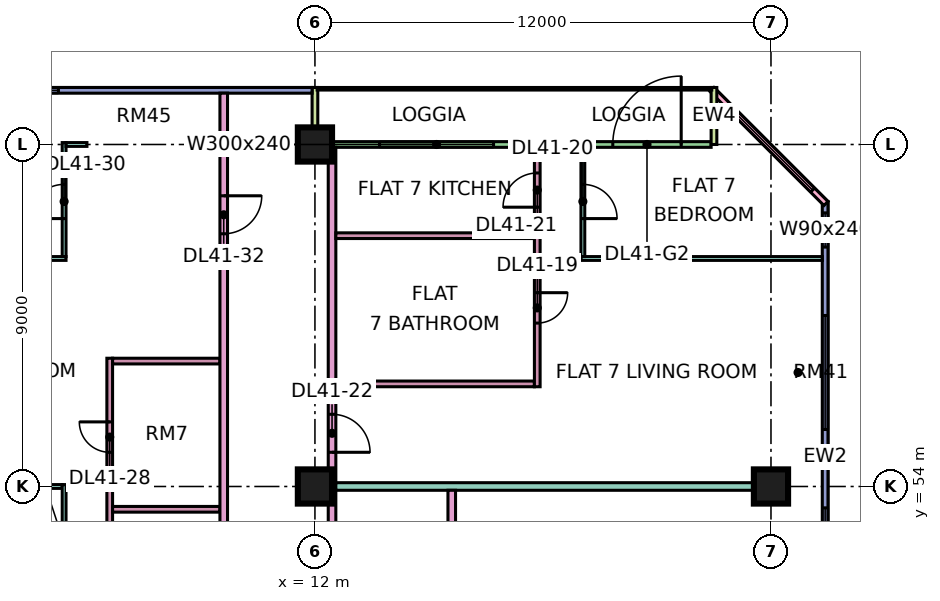
"""IFC4 building model, lengths in metres.
Left out: names, types, materials, properties, quantities, classifications, styles, units other than length and angle.
Written with IfcOpenShell. Run it as: python <this file> out.ifc"""

import sys

from ifc_helpers import new_model, si_unit, direction, frame, frame_2d, origin, origin_2d, place, context, subcontext, project, spatial, rectangle, extrude, element, fill, save


model = new_model("IFC4")
c1 = context("Model", 3, precision=1e-05, world=origin(), true_north=direction((0.0, 1.0)))
c2 = subcontext(c1, "Body", "Model", "MODEL_VIEW")
j1 = project(units=[si_unit("LENGTHUNIT", "METRE"), si_unit("PLANEANGLEUNIT", "RADIAN")], contexts=[c1])
p1 = place(None, origin())
s1 = spatial("IfcSite", under=j1, at=p1, CompositionType="ELEMENT")
p2 = place(p1, origin())
s2 = spatial("IfcBuilding", under=s1, at=p2, CompositionType="ELEMENT")
p3 = place(p2, frame((0.0, 0.0, 179.9)))
s3 = spatial("IfcBuildingStorey", under=s2, at=p3, CompositionType="ELEMENT", Elevation=179.9)
for number, where, z_axis, x_axis in (
    (1, (12.0, 54.0, 0.0), (0.0, 0.0, 1.0), (1.0, 0.0, 0.0)),
    (2, (12.0, 63.0, 0.0), (0.0, 0.0, 1.0), (1.0, 0.0, 0.0)),
    (3, (24.0, 54.0, 0.0), (0.0, 0.0, 1.0), (1.0, 0.0, 0.0)),
):
    element("IfcColumn", number, at=place(p3, frame(where, z_axis=z_axis, x_axis=x_axis)), inside=s3, PredefinedType="COLUMN", context=c2, shape_type="SweptSolid", body=[
        extrude(rectangle(XDim=0.9, YDim=0.9, at=origin_2d()), origin(), (0.0, 0.0, 1.0), 3.75),
    ])
p4 = place(p3, frame((25.425, 48.075, 0.0), z_axis=(0.0, 0.0, 1.0), x_axis=(0.0, 1.0, 0.0)))
e4 = element("IfcWall", 4, at=p4, inside=s3, PredefinedType="SOLIDWALL", context=c2, shape_type="SweptSolid", body=[
    extrude(rectangle(XDim=13.425, YDim=0.15, at=frame_2d((6.712, 0.0))), origin(), (0.0, 0.0, 1.0), 3.35),
])
p5 = place(p4, frame((0.562, 0.0, 0.45)))
e5 = element("IfcOpeningElement", 5, at=p5, cuts=e4, PredefinedType="OPENING", context=c2, shape_type="SweptSolid", body=[
    extrude(rectangle(XDim=4.8, YDim=2.4, at=frame_2d((2.4, 1.2))), frame((0.0, 0.085, 0.0), z_axis=(0.0, -1.0, 0.0), x_axis=(1.0, 0.0, 0.0)), (0.0, 0.0, 1.0), 0.17),
])
p6 = place(p4, frame((7.425, 0.0, 0.45)))
e6 = element("IfcOpeningElement", 6, at=p6, cuts=e4, PredefinedType="OPENING", context=c2, shape_type="SweptSolid", body=[
    extrude(rectangle(XDim=3.0, YDim=2.4, at=frame_2d((1.5, 1.2))), frame((0.0, 0.085, 0.0), z_axis=(0.0, -1.0, 0.0), x_axis=(1.0, 0.0, 0.0)), (0.0, 0.0, 1.0), 0.17),
])
p7 = place(p4, frame((12.225, 0.0, 0.45)))
e7 = element("IfcOpeningElement", 7, at=p7, cuts=e4, PredefinedType="OPENING", context=c2, shape_type="SweptSolid", body=[
    extrude(rectangle(XDim=0.9, YDim=2.4, at=frame_2d((0.45, 1.2))), frame((0.0, 0.085, 0.0), z_axis=(0.0, -1.0, 0.0), x_axis=(1.0, 0.0, 0.0)), (0.0, 0.0, 1.0), 0.17),
])
p8 = place(p3, frame((25.447, 61.447, 0.0), z_axis=(0.0, 0.0, 1.0), x_axis=(-0.707106781187, 0.707106781187, 0.0)))
e8 = element("IfcWall", 8, at=p8, inside=s3, PredefinedType="SOLIDWALL", context=c2, shape_type="SweptSolid", body=[
    extrude(rectangle(XDim=4.243, YDim=0.15, at=frame_2d((2.121, 0.0))), origin(), (0.0, 0.0, 1.0), 3.35),
])
p9 = place(p8, frame((0.498, 0.0, 0.45)))
e9 = element("IfcOpeningElement", 9, at=p9, cuts=e8, PredefinedType="OPENING", context=c2, shape_type="SweptSolid", body=[
    extrude(rectangle(XDim=3.0, YDim=2.4, at=frame_2d((1.5, 1.2))), frame((0.0, 0.085, 0.0), z_axis=(0.0, -1.0, 0.0), x_axis=(1.0, 0.0, 0.0)), (0.0, 0.0, 1.0), 0.17),
])
p10 = place(p3, frame((22.425, 63.0, 0.0), z_axis=(0.0, 0.0, 1.0), x_axis=(-1.0, 0.0, 0.0)))
e10 = element("IfcWall", 10, at=p10, inside=s3, PredefinedType="SOLIDWALL", context=c2, shape_type="SweptSolid", body=[
    extrude(rectangle(XDim=10.35, YDim=0.15, at=frame_2d((5.175, 0.0))), origin(), (0.0, 0.0, 1.0), 3.35),
])
p11 = place(p10, frame((0.788, 0.0, 0.0)))
e11 = element("IfcOpeningElement", 11, at=p11, cuts=e10, PredefinedType="OPENING", context=c2, shape_type="SweptSolid", body=[
    extrude(rectangle(XDim=1.8, YDim=2.4, at=frame_2d((0.9, 1.2))), frame((0.0, 0.085, 0.0), z_axis=(0.0, -1.0, 0.0), x_axis=(1.0, 0.0, 0.0)), (0.0, 0.0, 1.0), 0.17),
])
p12 = place(p10, frame((5.725, 0.0, 0.45)))
e12 = element("IfcOpeningElement", 12, at=p12, cuts=e10, PredefinedType="OPENING", context=c2, shape_type="SweptSolid", body=[
    extrude(rectangle(XDim=3.0, YDim=2.4, at=frame_2d((1.5, 1.2))), frame((0.0, 0.085, 0.0), z_axis=(0.0, -1.0, 0.0), x_axis=(1.0, 0.0, 0.0)), (0.0, 0.0, 1.0), 0.17),
])
for number, where, z_axis, x_axis in (
    (13, (22.5, 64.5, 0.0), (0.0, 0.0, 1.0), (0.0, -1.0, 0.0)),
    (14, (12.0, 64.5, 0.0), (0.0, 0.0, 1.0), (0.0, -1.0, 0.0)),
):
    element("IfcWall", number, at=place(p3, frame(where, z_axis=z_axis, x_axis=x_axis)), inside=s3, PredefinedType="SOLIDWALL", context=c2, shape_type="SweptSolid", body=[
        extrude(rectangle(XDim=1.5, YDim=0.15, at=frame_2d((0.75, 0.0))), origin(), (0.0, 0.0, 1.0), 3.35),
    ])
p13 = place(p3, frame((11.925, 64.425, 0.0), z_axis=(0.0, 0.0, 1.0), x_axis=(-1.0, 0.0, 0.0)))
e15 = element("IfcWall", 15, at=p13, inside=s3, PredefinedType="SOLIDWALL", context=c2, shape_type="SweptSolid", body=[
    extrude(rectangle(XDim=10.425, YDim=0.15, at=frame_2d((5.212, 0.0))), origin(), (0.0, 0.0, 1.0), 3.35),
])
p14 = place(p13, frame((6.675, 0.0, 0.45)))
e16 = element("IfcOpeningElement", 16, at=p14, cuts=e15, PredefinedType="OPENING", context=c2, shape_type="SweptSolid", body=[
    extrude(rectangle(XDim=3.0, YDim=2.4, at=frame_2d((1.5, 1.2))), frame((0.0, 0.085, 0.0), z_axis=(0.0, -1.0, 0.0), x_axis=(1.0, 0.0, 0.0)), (0.0, 0.0, 1.0), 0.17),
])
p15 = place(p3, frame((0.0, 54.0, 0.0), z_axis=(0.0, 0.0, 1.0), x_axis=(1.0, 0.0, 0.0)))
e17 = element("IfcWall", 17, at=p15, inside=s3, PredefinedType="PARTITIONING", context=c2, shape_type="SweptSolid", body=[
    extrude(rectangle(XDim=5.35, YDim=0.1, at=frame_2d((2.675, 0.0))), origin(), (0.0, 0.0, 1.0), 3.35),
])
p16 = place(p3, frame((-1.35, 60.0, 0.0), z_axis=(0.0, 0.0, 1.0), x_axis=(1.0, 0.0, 0.0)))
e18 = element("IfcWall", 18, at=p16, inside=s3, PredefinedType="PARTITIONING", context=c2, shape_type="SweptSolid", body=[
    extrude(rectangle(XDim=6.8, YDim=0.1, at=frame_2d((3.4, 0.0))), origin(), (0.0, 0.0, 1.0), 3.35),
])
p17 = place(p3, frame((5.4, 48.1, 0.0), z_axis=(0.0, 0.0, 1.0), x_axis=(0.0, 1.0, 0.0)))
e19 = element("IfcWall", 19, at=p17, inside=s3, PredefinedType="PARTITIONING", context=c2, shape_type="SweptSolid", body=[
    extrude(rectangle(XDim=5.95, YDim=0.1, at=frame_2d((2.975, 0.0))), origin(), (0.0, 0.0, 1.0), 3.35),
])
p18 = place(p17, frame((0.95, 0.0, 0.0)))
e20 = element("IfcOpeningElement", 20, at=p18, cuts=e19, PredefinedType="OPENING", context=c2, shape_type="SweptSolid", body=[
    extrude(rectangle(XDim=0.9, YDim=2.1, at=frame_2d((0.45, 1.05))), frame((0.0, 0.06, 0.0), z_axis=(0.0, -1.0, 0.0), x_axis=(1.0, 0.0, 0.0)), (0.0, 0.0, 1.0), 0.12),
])
p19 = place(p17, frame((3.95, 0.0, 0.0)))
e21 = element("IfcOpeningElement", 21, at=p19, cuts=e19, PredefinedType="OPENING", context=c2, shape_type="SweptSolid", body=[
    extrude(rectangle(XDim=0.9, YDim=2.1, at=frame_2d((0.45, 1.05))), frame((0.0, 0.06, 0.0), z_axis=(0.0, -1.0, 0.0), x_axis=(1.0, 0.0, 0.0)), (0.0, 0.0, 1.0), 0.12),
])
p20 = place(p3, frame((5.4, 60.05, 0.0), z_axis=(0.0, 0.0, 1.0), x_axis=(0.0, 1.0, 0.0)))
e22 = element("IfcWall", 22, at=p20, inside=s3, PredefinedType="PARTITIONING", context=c2, shape_type="SweptSolid", body=[
    extrude(rectangle(XDim=3.0, YDim=0.1, at=frame_2d((1.5, 0.0))), origin(), (0.0, 0.0, 1.0), 3.35),
])
p21 = place(p20, frame((1.0, 0.0, 0.0)))
e23 = element("IfcOpeningElement", 23, at=p21, cuts=e22, PredefinedType="OPENING", context=c2, shape_type="SweptSolid", body=[
    extrude(rectangle(XDim=0.9, YDim=2.1, at=frame_2d((0.45, 1.05))), frame((0.0, 0.06, 0.0), z_axis=(0.0, -1.0, 0.0), x_axis=(1.0, 0.0, 0.0)), (0.0, 0.0, 1.0), 0.12),
])
p22 = place(p3, frame((5.45, 63.0, 0.0), z_axis=(0.0, 0.0, 1.0), x_axis=(1.0, 0.0, 0.0)))
e24 = element("IfcWall", 24, at=p22, inside=s3, PredefinedType="PARTITIONING", context=c2, shape_type="SweptSolid", body=[
    extrude(rectangle(XDim=0.55, YDim=0.1, at=frame_2d((0.275, 0.0))), origin(), (0.0, 0.0, 1.0), 3.35),
])
p23 = place(p3, frame((6.6, 48.1, 0.0), z_axis=(0.0, 0.0, 1.0), x_axis=(0.0, 1.0, 0.0)))
e25 = element("IfcWall", 25, at=p23, inside=s3, PredefinedType="PARTITIONING", context=c2, shape_type="SweptSolid", body=[
    extrude(rectangle(XDim=9.275, YDim=0.15, at=frame_2d((4.637, 0.0))), origin(), (0.0, 0.0, 1.0), 3.35),
])
p24 = place(p23, frame((6.8, 0.0, 0.0)))
e26 = element("IfcOpeningElement", 26, at=p24, cuts=e25, PredefinedType="OPENING", context=c2, shape_type="SweptSolid", body=[
    extrude(rectangle(XDim=0.8, YDim=2.1, at=frame_2d((0.4, 1.05))), frame((0.0, 0.085, 0.0), z_axis=(0.0, -1.0, 0.0), x_axis=(1.0, 0.0, 0.0)), (0.0, 0.0, 1.0), 0.17),
])
p25 = place(p23, frame((2.15, 0.0, 0.0)))
e27 = element("IfcOpeningElement", 27, at=p25, cuts=e25, PredefinedType="OPENING", context=c2, shape_type="SweptSolid", body=[
    extrude(rectangle(XDim=0.9, YDim=2.1, at=frame_2d((0.45, 1.05))), frame((0.0, 0.085, 0.0), z_axis=(0.0, -1.0, 0.0), x_axis=(1.0, 0.0, 0.0)), (0.0, 0.0, 1.0), 0.17),
])
for number, where, z_axis, x_axis in (
    (28, (6.675, 53.4, 0.0), (0.0, 0.0, 1.0), (1.0, 0.0, 0.0)),
    (29, (6.675, 57.3, 0.0), (0.0, 0.0, 1.0), (1.0, 0.0, 0.0)),
):
    element("IfcWall", number, at=place(p3, frame(where, z_axis=z_axis, x_axis=x_axis)), inside=s3, PredefinedType="PARTITIONING", context=c2, shape_type="SweptSolid", body=[
        extrude(rectangle(XDim=2.825, YDim=0.15, at=frame_2d((1.413, 0.0))), origin(), (0.0, 0.0, 1.0), 3.35),
    ])
p26 = place(p3, frame((9.6, 20.0, 0.0), z_axis=(0.0, 0.0, 1.0), x_axis=(0.0, 1.0, 0.0)))
e30 = element("IfcWall", 30, at=p26, inside=s3, PredefinedType="PARTITIONING", context=c2, shape_type="SweptSolid", body=[
    extrude(rectangle(XDim=44.35, YDim=0.2, at=frame_2d((22.175, 0.0))), origin(), (0.0, 0.0, 1.0), 3.35),
])
p27 = place(p26, frame((16.8, 0.0, 0.0)))
e31 = element("IfcOpeningElement", 31, at=p27, cuts=e30, PredefinedType="OPENING", context=c2, shape_type="SweptSolid", body=[
    extrude(rectangle(XDim=1.0, YDim=2.1, at=frame_2d((0.5, 1.05))), frame((0.0, 0.11, 0.0), z_axis=(0.0, -1.0, 0.0), x_axis=(1.0, 0.0, 0.0)), (0.0, 0.0, 1.0), 0.22),
])
p28 = place(p26, frame((40.65, 0.0, 0.0)))
e32 = element("IfcOpeningElement", 32, at=p28, cuts=e30, PredefinedType="OPENING", context=c2, shape_type="SweptSolid", body=[
    extrude(rectangle(XDim=1.0, YDim=2.1, at=frame_2d((0.5, 1.05))), frame((0.0, 0.11, 0.0), z_axis=(0.0, -1.0, 0.0), x_axis=(1.0, 0.0, 0.0)), (0.0, 0.0, 1.0), 0.22),
])
p29 = place(p26, frame((0.6, 0.0, 0.0)))
e33 = element("IfcOpeningElement", 33, at=p29, cuts=e30, PredefinedType="OPENING", context=c2, shape_type="SweptSolid", body=[
    extrude(rectangle(XDim=1.2, YDim=2.1, at=frame_2d((0.6, 1.05))), frame((0.0, 0.11, 0.0), z_axis=(0.0, -1.0, 0.0), x_axis=(1.0, 0.0, 0.0)), (0.0, 0.0, 1.0), 0.22),
])
p30 = place(p26, frame((4.2, 0.0, 0.0)))
e34 = element("IfcOpeningElement", 34, at=p30, cuts=e30, PredefinedType="OPENING", context=c2, shape_type="SweptSolid", body=[
    extrude(rectangle(XDim=1.0, YDim=2.1, at=frame_2d((0.5, 1.05))), frame((0.0, 0.11, 0.0), z_axis=(0.0, -1.0, 0.0), x_axis=(1.0, 0.0, 0.0)), (0.0, 0.0, 1.0), 0.22),
])
p31 = place(p3, frame((12.45, 20.0, 0.0), z_axis=(0.0, 0.0, 1.0), x_axis=(0.0, 1.0, 0.0)))
e35 = element("IfcWall", 35, at=p31, inside=s3, PredefinedType="PARTITIONING", context=c2, shape_type="SweptSolid", body=[
    extrude(rectangle(XDim=42.926, YDim=0.2, at=frame_2d((21.463, 0.0))), origin(), (0.0, 0.0, 1.0), 3.35),
])
p32 = place(p31, frame((5.95, 0.0, 0.0)))
e36 = element("IfcOpeningElement", 36, at=p32, cuts=e35, PredefinedType="OPENING", context=c2, shape_type="SweptSolid", body=[
    extrude(rectangle(XDim=1.0, YDim=2.1, at=frame_2d((0.5, 1.05))), frame((0.0, 0.11, 0.0), z_axis=(0.0, -1.0, 0.0), x_axis=(1.0, 0.0, 0.0)), (0.0, 0.0, 1.0), 0.22),
])
p33 = place(p31, frame((12.0, 0.0, 0.0)))
e37 = element("IfcOpeningElement", 37, at=p33, cuts=e35, PredefinedType="OPENING", context=c2, shape_type="SweptSolid", body=[
    extrude(rectangle(XDim=1.0, YDim=2.1, at=frame_2d((0.5, 1.05))), frame((0.0, 0.11, 0.0), z_axis=(0.0, -1.0, 0.0), x_axis=(1.0, 0.0, 0.0)), (0.0, 0.0, 1.0), 0.22),
])
p34 = place(p31, frame((16.9, 0.0, 0.0)))
e38 = element("IfcOpeningElement", 38, at=p34, cuts=e35, PredefinedType="OPENING", context=c2, shape_type="SweptSolid", body=[
    extrude(rectangle(XDim=1.0, YDim=2.1, at=frame_2d((0.5, 1.05))), frame((0.0, 0.11, 0.0), z_axis=(0.0, -1.0, 0.0), x_axis=(1.0, 0.0, 0.0)), (0.0, 0.0, 1.0), 0.22),
])
p35 = place(p31, frame((34.9, 0.0, 0.0)))
e39 = element("IfcOpeningElement", 39, at=p35, cuts=e35, PredefinedType="OPENING", context=c2, shape_type="SweptSolid", body=[
    extrude(rectangle(XDim=1.0, YDim=2.1, at=frame_2d((0.5, 1.05))), frame((0.0, 0.11, 0.0), z_axis=(0.0, -1.0, 0.0), x_axis=(1.0, 0.0, 0.0)), (0.0, 0.0, 1.0), 0.22),
])
p36 = place(p31, frame((1.15, 0.0, 0.0)))
e40 = element("IfcOpeningElement", 40, at=p36, cuts=e35, PredefinedType="OPENING", context=c2, shape_type="SweptSolid", body=[
    extrude(rectangle(XDim=1.8, YDim=2.1, at=frame_2d((0.9, 1.05))), frame((0.0, 0.11, 0.0), z_axis=(0.0, -1.0, 0.0), x_axis=(1.0, 0.0, 0.0)), (0.0, 0.0, 1.0), 0.22),
])
p37 = place(p31, frame((28.6, 0.0, 0.0)))
e41 = element("IfcOpeningElement", 41, at=p37, cuts=e35, PredefinedType="OPENING", context=c2, shape_type="SweptSolid", body=[
    extrude(rectangle(XDim=1.8, YDim=2.1, at=frame_2d((0.9, 1.05))), frame((0.0, 0.11, 0.0), z_axis=(0.0, -1.0, 0.0), x_axis=(1.0, 0.0, 0.0)), (0.0, 0.0, 1.0), 0.22),
])
p38 = place(p3, frame((12.55, 54.0, 0.0), z_axis=(0.0, 0.0, 1.0), x_axis=(1.0, 0.0, 0.0)))
e42 = element("IfcWall", 42, at=p38, inside=s3, PredefinedType="PARTITIONING", context=c2, shape_type="SweptSolid", body=[
    extrude(rectangle(XDim=11.45, YDim=0.2, at=frame_2d((5.725, 0.0))), origin(), (0.0, 0.0, 1.0), 3.35),
])
for number, where, z_axis, x_axis in (
    (43, (12.55, 56.7, 0.0), (0.0, 0.0, 1.0), (1.0, 0.0, 0.0)),
    (44, (12.55, 60.6, 0.0), (0.0, 0.0, 1.0), (1.0, 0.0, 0.0)),
):
    element("IfcWall", number, at=place(p3, frame(where, z_axis=z_axis, x_axis=x_axis)), inside=s3, PredefinedType="PARTITIONING", context=c2, shape_type="SweptSolid", body=[
        extrude(rectangle(XDim=5.225, YDim=0.15, at=frame_2d((2.612, 0.0))), origin(), (0.0, 0.0, 1.0), 3.35),
    ])
p39 = place(p3, frame((15.6, 51.225, 0.0), z_axis=(0.0, 0.0, 1.0), x_axis=(0.0, 1.0, 0.0)))
e45 = element("IfcWall", 45, at=p39, inside=s3, PredefinedType="PARTITIONING", context=c2, shape_type="SweptSolid", body=[
    extrude(rectangle(XDim=2.675, YDim=0.2, at=frame_2d((1.337, 0.0))), origin(), (0.0, 0.0, 1.0), 3.35),
])
p40 = place(p3, frame((17.85, 56.625, 0.0), z_axis=(0.0, 0.0, 1.0), x_axis=(0.0, 1.0, 0.0)))
e46 = element("IfcWall", 46, at=p40, inside=s3, PredefinedType="PARTITIONING", context=c2, shape_type="SweptSolid", body=[
    extrude(rectangle(XDim=6.301, YDim=0.15, at=frame_2d((3.15, 0.0))), origin(), (0.0, 0.0, 1.0), 3.35),
])
p41 = place(p40, frame((1.675, 0.0, 0.0)))
e47 = element("IfcOpeningElement", 47, at=p41, cuts=e46, PredefinedType="OPENING", context=c2, shape_type="SweptSolid", body=[
    extrude(rectangle(XDim=0.8, YDim=2.1, at=frame_2d((0.4, 1.05))), frame((0.0, 0.085, 0.0), z_axis=(0.0, -1.0, 0.0), x_axis=(1.0, 0.0, 0.0)), (0.0, 0.0, 1.0), 0.17),
])
p42 = place(p40, frame((4.725, 0.0, 0.0)))
e48 = element("IfcOpeningElement", 48, at=p42, cuts=e46, PredefinedType="OPENING", context=c2, shape_type="SweptSolid", body=[
    extrude(rectangle(XDim=0.9, YDim=2.1, at=frame_2d((0.45, 1.05))), frame((0.0, 0.085, 0.0), z_axis=(0.0, -1.0, 0.0), x_axis=(1.0, 0.0, 0.0)), (0.0, 0.0, 1.0), 0.17),
])
p43 = place(p3, frame((19.0, 60.0, 0.0), z_axis=(0.0, 0.0, 1.0), x_axis=(1.0, 0.0, 0.0)))
e49 = element("IfcWall", 49, at=p43, inside=s3, PredefinedType="PARTITIONING", context=c2, shape_type="SweptSolid", body=[
    extrude(rectangle(XDim=6.35, YDim=0.1, at=frame_2d((3.175, 0.0))), origin(), (0.0, 0.0, 1.0), 3.35),
])
p44 = place(p3, frame((19.05, 60.05, 0.0), z_axis=(0.0, 0.0, 1.0), x_axis=(0.0, 1.0, 0.0)))
e50 = element("IfcWall", 50, at=p44, inside=s3, PredefinedType="PARTITIONING", context=c2, shape_type="SweptSolid", body=[
    extrude(rectangle(XDim=2.876, YDim=0.1, at=frame_2d((1.438, 0.0))), origin(), (0.0, 0.0, 1.0), 3.35),
])
p45 = place(p44, frame((1.0, 0.0, 0.0)))
e51 = element("IfcOpeningElement", 51, at=p45, cuts=e50, PredefinedType="OPENING", context=c2, shape_type="SweptSolid", body=[
    extrude(rectangle(XDim=0.9, YDim=2.1, at=frame_2d((0.45, 1.05))), frame((0.0, 0.06, 0.0), z_axis=(0.0, -1.0, 0.0), x_axis=(1.0, 0.0, 0.0)), (0.0, 0.0, 1.0), 0.12),
])
p46 = place(p5, origin())
e52 = element("IfcWindow", 52, at=p46, inside=s3, PartitioningType="SINGLE_PANEL", PredefinedType="WINDOW", context=c2, shape_type="SweptSolid", body=[
    extrude(rectangle(XDim=4.8, YDim=2.4, at=frame_2d((2.4, 1.2))), frame((0.0, 0.03, 0.0), z_axis=(0.0, -1.0, 0.0), x_axis=(1.0, 0.0, 0.0)), (0.0, 0.0, 1.0), 0.06),
])
fill(e5, e52)
p47 = place(p6, origin())
e53 = element("IfcWindow", 53, at=p47, inside=s3, PartitioningType="SINGLE_PANEL", PredefinedType="WINDOW", context=c2, shape_type="SweptSolid", body=[
    extrude(rectangle(XDim=3.0, YDim=2.4, at=frame_2d((1.5, 1.2))), frame((0.0, 0.03, 0.0), z_axis=(0.0, -1.0, 0.0), x_axis=(1.0, 0.0, 0.0)), (0.0, 0.0, 1.0), 0.06),
])
fill(e6, e53)
p48 = place(p7, origin())
e54 = element("IfcWindow", 54, at=p48, inside=s3, PartitioningType="SINGLE_PANEL", PredefinedType="WINDOW", context=c2, shape_type="SweptSolid", body=[
    extrude(rectangle(XDim=0.9, YDim=2.4, at=frame_2d((0.45, 1.2))), frame((0.0, 0.03, 0.0), z_axis=(0.0, -1.0, 0.0), x_axis=(1.0, 0.0, 0.0)), (0.0, 0.0, 1.0), 0.06),
])
fill(e7, e54)
p49 = place(p9, origin())
e55 = element("IfcWindow", 55, at=p49, inside=s3, PartitioningType="SINGLE_PANEL", PredefinedType="WINDOW", context=c2, shape_type="SweptSolid", body=[
    extrude(rectangle(XDim=3.0, YDim=2.4, at=frame_2d((1.5, 1.2))), frame((0.0, 0.03, 0.0), z_axis=(0.0, -1.0, 0.0), x_axis=(1.0, 0.0, 0.0)), (0.0, 0.0, 1.0), 0.06),
])
fill(e9, e55)
p50 = place(p11, frame((1.8, 0.0, 0.0), z_axis=(0.0, 0.0, 1.0), x_axis=(-1.0, 0.0, 0.0)))
e56 = element("IfcDoor", 56, at=p50, inside=s3, OperationType="DOUBLE_DOOR_SINGLE_SWING", PredefinedType="DOOR", context=c2, shape_type="SweptSolid", body=[
    extrude(rectangle(XDim=1.8, YDim=2.4, at=frame_2d((0.9, 1.2))), frame((0.0, 0.025, 0.0), z_axis=(0.0, -1.0, 0.0), x_axis=(1.0, 0.0, 0.0)), (0.0, 0.0, 1.0), 0.05),
])
fill(e11, e56)
p51 = place(p12, origin())
e57 = element("IfcWindow", 57, at=p51, inside=s3, PartitioningType="SINGLE_PANEL", PredefinedType="WINDOW", context=c2, shape_type="SweptSolid", body=[
    extrude(rectangle(XDim=3.0, YDim=2.4, at=frame_2d((1.5, 1.2))), frame((0.0, 0.03, 0.0), z_axis=(0.0, -1.0, 0.0), x_axis=(1.0, 0.0, 0.0)), (0.0, 0.0, 1.0), 0.06),
])
fill(e12, e57)
p52 = place(p14, origin())
e58 = element("IfcWindow", 58, at=p52, inside=s3, PartitioningType="SINGLE_PANEL", PredefinedType="WINDOW", context=c2, shape_type="SweptSolid", body=[
    extrude(rectangle(XDim=3.0, YDim=2.4, at=frame_2d((1.5, 1.2))), frame((0.0, 0.03, 0.0), z_axis=(0.0, -1.0, 0.0), x_axis=(1.0, 0.0, 0.0)), (0.0, 0.0, 1.0), 0.06),
])
fill(e16, e58)
p53 = place(p41, origin())
e59 = element("IfcDoor", 59, at=p53, inside=s3, OperationType="SINGLE_SWING_RIGHT", PredefinedType="DOOR", context=c2, shape_type="SweptSolid", body=[
    extrude(rectangle(XDim=0.8, YDim=2.1, at=frame_2d((0.4, 1.05))), frame((0.0, 0.025, 0.0), z_axis=(0.0, -1.0, 0.0), x_axis=(1.0, 0.0, 0.0)), (0.0, 0.0, 1.0), 0.05),
])
fill(e47, e59)
p54 = place(p45, frame((0.9, 0.0, 0.0), z_axis=(0.0, 0.0, 1.0), x_axis=(-1.0, 0.0, 0.0)))
e60 = element("IfcDoor", 60, at=p54, inside=s3, OperationType="SINGLE_SWING_LEFT", PredefinedType="DOOR", context=c2, shape_type="SweptSolid", body=[
    extrude(rectangle(XDim=0.9, YDim=2.1, at=frame_2d((0.45, 1.05))), frame((0.0, 0.025, 0.0), z_axis=(0.0, -1.0, 0.0), x_axis=(1.0, 0.0, 0.0)), (0.0, 0.0, 1.0), 0.05),
])
fill(e51, e60)
p55 = place(p42, origin())
e61 = element("IfcDoor", 61, at=p55, inside=s3, OperationType="SINGLE_SWING_LEFT", PredefinedType="DOOR", context=c2, shape_type="SweptSolid", body=[
    extrude(rectangle(XDim=0.9, YDim=2.1, at=frame_2d((0.45, 1.05))), frame((0.0, 0.025, 0.0), z_axis=(0.0, -1.0, 0.0), x_axis=(1.0, 0.0, 0.0)), (0.0, 0.0, 1.0), 0.05),
])
fill(e48, e61)
p56 = place(p35, frame((1.0, 0.0, 0.0), z_axis=(0.0, 0.0, 1.0), x_axis=(-1.0, 0.0, 0.0)))
e62 = element("IfcDoor", 62, at=p56, inside=s3, OperationType="SINGLE_SWING_LEFT", PredefinedType="DOOR", context=c2, shape_type="SweptSolid", body=[
    extrude(rectangle(XDim=1.0, YDim=2.1, at=frame_2d((0.5, 1.05))), frame((0.0, 0.025, 0.0), z_axis=(0.0, -1.0, 0.0), x_axis=(1.0, 0.0, 0.0)), (0.0, 0.0, 1.0), 0.05),
])
fill(e39, e62)
p57 = place(p24, frame((0.8, 0.0, 0.0), z_axis=(0.0, 0.0, 1.0), x_axis=(-1.0, 0.0, 0.0)))
e63 = element("IfcDoor", 63, at=p57, inside=s3, OperationType="SINGLE_SWING_RIGHT", PredefinedType="DOOR", context=c2, shape_type="SweptSolid", body=[
    extrude(rectangle(XDim=0.8, YDim=2.1, at=frame_2d((0.4, 1.05))), frame((0.0, 0.025, 0.0), z_axis=(0.0, -1.0, 0.0), x_axis=(1.0, 0.0, 0.0)), (0.0, 0.0, 1.0), 0.05),
])
fill(e26, e63)
p58 = place(p21, origin())
e64 = element("IfcDoor", 64, at=p58, inside=s3, OperationType="SINGLE_SWING_LEFT", PredefinedType="DOOR", context=c2, shape_type="SweptSolid", body=[
    extrude(rectangle(XDim=0.9, YDim=2.1, at=frame_2d((0.45, 1.05))), frame((0.0, 0.025, 0.0), z_axis=(0.0, -1.0, 0.0), x_axis=(1.0, 0.0, 0.0)), (0.0, 0.0, 1.0), 0.05),
])
fill(e23, e64)
p59 = place(p28, origin())
e65 = element("IfcDoor", 65, at=p59, inside=s3, OperationType="SINGLE_SWING_RIGHT", PredefinedType="DOOR", context=c2, shape_type="SweptSolid", body=[
    extrude(rectangle(XDim=1.0, YDim=2.1, at=frame_2d((0.5, 1.05))), frame((0.0, 0.025, 0.0), z_axis=(0.0, -1.0, 0.0), x_axis=(1.0, 0.0, 0.0)), (0.0, 0.0, 1.0), 0.05),
])
fill(e32, e65)
save(model, sys.argv[1])
